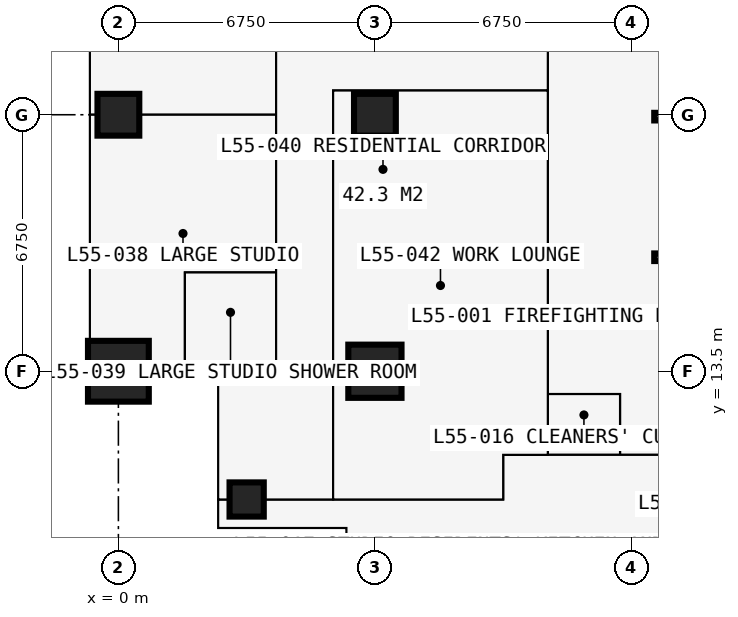
"""IFC4 building model, lengths in metres.
Left out: names, types, materials, properties, quantities, classifications, styles, units other than length and angle.
Written with IfcOpenShell. Run it as: python <this file> out.ifc"""

import sys

from ifc_helpers import new_model, si_unit, direction, frame, frame_2d, origin, origin_2d, place, context, subcontext, project, spatial, rectangle, extrude, element, fill, save


model = new_model("IFC4")
c1 = context("Model", 3, precision=1e-05, world=origin(), true_north=direction((0.0, 1.0)))
c2 = subcontext(c1, "Body", "Model", "MODEL_VIEW")
j1 = project(units=[si_unit("LENGTHUNIT", "METRE"), si_unit("PLANEANGLEUNIT", "RADIAN")], contexts=[c1])
p1 = place(None, origin())
s1 = spatial("IfcSite", under=j1, at=p1, CompositionType="ELEMENT")
p2 = place(p1, origin())
s2 = spatial("IfcBuilding", under=s1, at=p2, CompositionType="ELEMENT")
p3 = place(p2, frame((0.0, 0.0, 204.3)))
s3 = spatial("IfcBuildingStorey", under=s2, at=p3, CompositionType="ELEMENT", Elevation=204.3)
p4 = place(p3, frame((0.0, 13.5, 0.0), z_axis=(0.0, 0.0, 1.0), x_axis=(1.0, 0.0, 0.0)))
e1 = element("IfcColumn", 1, at=p4, inside=s3, PredefinedType="COLUMN", context=c2, shape_type="SweptSolid", body=[
    extrude(rectangle(XDim=1.6, YDim=1.6, at=origin_2d()), origin(), (0.0, 0.0, 1.0), 3.6),
])
p5 = place(p3, frame((0.0, 20.25, 0.0), z_axis=(0.0, 0.0, 1.0), x_axis=(1.0, 0.0, 0.0)))
e2 = element("IfcColumn", 2, at=p5, inside=s3, PredefinedType="COLUMN", context=c2, shape_type="SweptSolid", body=[
    extrude(rectangle(XDim=1.1, YDim=1.1, at=origin_2d()), origin(), (0.0, 0.0, 1.0), 3.6),
])
p6 = place(p3, frame((3.375, 10.125, 0.0), z_axis=(0.0, 0.0, 1.0), x_axis=(1.0, 0.0, 0.0)))
e3 = element("IfcColumn", 3, at=p6, inside=s3, PredefinedType="COLUMN", context=c2, shape_type="SweptSolid", body=[
    extrude(rectangle(XDim=0.9, YDim=0.9, at=origin_2d()), origin(), (0.0, 0.0, 1.0), 3.6),
])
p7 = place(p3, frame((6.75, 13.5, 0.0), z_axis=(0.0, 0.0, 1.0), x_axis=(1.0, 0.0, 0.0)))
e4 = element("IfcColumn", 4, at=p7, inside=s3, PredefinedType="COLUMN", context=c2, shape_type="SweptSolid", body=[
    extrude(rectangle(XDim=1.4, YDim=1.4, at=origin_2d()), origin(), (0.0, 0.0, 1.0), 3.6),
])
p8 = place(p3, frame((6.75, 20.25, 0.0), z_axis=(0.0, 0.0, 1.0), x_axis=(1.0, 0.0, 0.0)))
e5 = element("IfcColumn", 5, at=p8, inside=s3, PredefinedType="COLUMN", context=c2, shape_type="SweptSolid", body=[
    extrude(rectangle(XDim=1.1, YDim=1.1, at=origin_2d()), origin(), (0.0, 0.0, 1.0), 3.6),
])
p9 = place(p3, frame((13.2, 13.5, 0.0), z_axis=(0.0, 0.0, 1.0), x_axis=(1.0, 0.0, 0.0)))
e6 = element("IfcWall", 6, at=p9, inside=s3, PredefinedType="SHEAR", context=c2, shape_type="SweptSolid", body=[
    extrude(rectangle(XDim=14.1, YDim=1.2, at=frame_2d((7.05, 0.0))), origin(), (0.0, 0.0, 1.0), 3.6),
])
p10 = place(p3, frame((13.65, 26.4, 0.0), z_axis=(0.0, 0.0, 1.0), x_axis=(0.0, -1.0, 0.0)))
e7 = element("IfcWall", 7, at=p10, inside=s3, PredefinedType="SHEAR", context=c2, shape_type="SweptSolid", body=[
    extrude(rectangle(XDim=12.3, YDim=0.9, at=frame_2d((6.15, 0.0))), origin(), (0.0, 0.0, 1.0), 3.6),
])
p11 = place(p10, frame((7.45, 0.0, 0.0)))
e8 = element("IfcOpeningElement", 8, at=p11, cuts=e7, PredefinedType="OPENING", context=c2, shape_type="SweptSolid", body=[
    extrude(rectangle(XDim=1.2, YDim=2.2, at=frame_2d((0.6, 1.1))), frame((0.0, 0.46, 0.0), z_axis=(0.0, -1.0, 0.0), x_axis=(1.0, 0.0, 0.0)), (0.0, 0.0, 1.0), 0.92),
])
p12 = place(p3, frame((-0.75, 12.75, 0.0), z_axis=(0.0, 0.0, 1.0), x_axis=(1.0, 0.0, 0.0)))
e9 = element("IfcWall", 9, at=p12, inside=s3, PredefinedType="SOLIDWALL", context=c2, shape_type="SweptSolid", body=[
    extrude(rectangle(XDim=3.375, YDim=0.3, at=frame_2d((1.688, 0.0))), origin(), (0.0, 0.0, 1.0), 3.375),
])
p13 = place(p12, frame((1.633, 0.0, 0.9)))
e10 = element("IfcOpeningElement", 10, at=p13, cuts=e9, PredefinedType="OPENING", context=c2, shape_type="SweptSolid", body=[
    extrude(rectangle(XDim=1.5, YDim=1.8, at=frame_2d((0.75, 0.9))), frame((0.0, 0.16, 0.0), z_axis=(0.0, -1.0, 0.0), x_axis=(1.0, 0.0, 0.0)), (0.0, 0.0, 1.0), 0.32),
])
p14 = place(p3, frame((2.625, 12.75, 0.0), z_axis=(0.0, 0.0, 1.0), x_axis=(0.0, -1.0, 0.0)))
e11 = element("IfcWall", 11, at=p14, inside=s3, PredefinedType="SOLIDWALL", context=c2, shape_type="SweptSolid", body=[
    extrude(rectangle(XDim=3.375, YDim=0.3, at=frame_2d((1.688, 0.0))), origin(), (0.0, 0.0, 1.0), 3.375),
])
p15 = place(p14, frame((0.788, 0.0, 0.6)))
e12 = element("IfcOpeningElement", 12, at=p15, cuts=e11, PredefinedType="OPENING", context=c2, shape_type="SweptSolid", body=[
    extrude(rectangle(XDim=1.8, YDim=2.1, at=frame_2d((0.9, 1.05))), frame((0.0, 0.16, 0.0), z_axis=(0.0, -1.0, 0.0), x_axis=(1.0, 0.0, 0.0)), (0.0, 0.0, 1.0), 0.32),
])
p16 = place(p3, frame((2.625, 9.375, 0.0), z_axis=(0.0, 0.0, 1.0), x_axis=(1.0, 0.0, 0.0)))
e13 = element("IfcWall", 13, at=p16, inside=s3, PredefinedType="SOLIDWALL", context=c2, shape_type="SweptSolid", body=[
    extrude(rectangle(XDim=3.375, YDim=0.3, at=frame_2d((1.688, 0.0))), origin(), (0.0, 0.0, 1.0), 3.375),
])
p17 = place(p16, frame((0.788, 0.0, 0.6)))
e14 = element("IfcOpeningElement", 14, at=p17, cuts=e13, PredefinedType="OPENING", context=c2, shape_type="SweptSolid", body=[
    extrude(rectangle(XDim=1.8, YDim=2.1, at=frame_2d((0.9, 1.05))), frame((0.0, 0.16, 0.0), z_axis=(0.0, -1.0, 0.0), x_axis=(1.0, 0.0, 0.0)), (0.0, 0.0, 1.0), 0.32),
])
p18 = place(p3, frame((6.0, 9.375, 0.0), z_axis=(0.0, 0.0, 1.0), x_axis=(0.0, -1.0, 0.0)))
e15 = element("IfcWall", 15, at=p18, inside=s3, PredefinedType="SOLIDWALL", context=c2, shape_type="SweptSolid", body=[
    extrude(rectangle(XDim=3.375, YDim=0.3, at=frame_2d((1.688, 0.0))), origin(), (0.0, 0.0, 1.0), 3.375),
])
p19 = place(p18, frame((0.788, 0.0, 0.6)))
e16 = element("IfcOpeningElement", 16, at=p19, cuts=e15, PredefinedType="OPENING", context=c2, shape_type="SweptSolid", body=[
    extrude(rectangle(XDim=1.8, YDim=2.1, at=frame_2d((0.9, 1.05))), frame((0.0, 0.16, 0.0), z_axis=(0.0, -1.0, 0.0), x_axis=(1.0, 0.0, 0.0)), (0.0, 0.0, 1.0), 0.32),
])
p20 = place(p3, frame((1.15, 7.4, -0.06), z_axis=(0.0, 0.0, 1.0), x_axis=(0.0, 1.0, 0.0)))
e17 = element("IfcWall", 17, at=p20, inside=s3, PredefinedType="USERDEFINED", context=c2, shape_type="SweptSolid", body=[
    extrude(rectangle(XDim=3.75, YDim=0.8, at=frame_2d((1.875, 0.0))), origin(), (0.0, 0.0, 1.0), 0.66),
])
p21 = place(p3, frame((14.1, 16.5, 0.0), z_axis=(0.0, 0.0, 1.0), x_axis=(1.0, 0.0, 0.0)))
e18 = element("IfcWall", 18, at=p21, inside=s3, PredefinedType="SHEAR", context=c2, shape_type="SweptSolid", body=[
    extrude(rectangle(XDim=12.3, YDim=0.2, at=frame_2d((6.15, 0.0))), origin(), (0.0, 0.0, 1.0), 3.6),
])
p22 = place(p21, frame((0.9, 0.0, 0.0)))
e19 = element("IfcOpeningElement", 19, at=p22, cuts=e18, PredefinedType="OPENING", context=c2, shape_type="SweptSolid", body=[
    extrude(rectangle(XDim=1.1, YDim=2.2, at=frame_2d((0.55, 1.1))), frame((0.0, 0.11, 0.0), z_axis=(0.0, -1.0, 0.0), x_axis=(1.0, 0.0, 0.0)), (0.0, 0.0, 1.0), 0.22),
])
p23 = place(p21, frame((4.31, 0.0, 0.0)))
e20 = element("IfcOpeningElement", 20, at=p23, cuts=e18, PredefinedType="OPENING", context=c2, shape_type="SweptSolid", body=[
    extrude(rectangle(XDim=1.1, YDim=2.2, at=frame_2d((0.55, 1.1))), frame((0.0, 0.11, 0.0), z_axis=(0.0, -1.0, 0.0), x_axis=(1.0, 0.0, 0.0)), (0.0, 0.0, 1.0), 0.22),
])
p24 = place(p21, frame((6.45, 0.0, 0.0)))
e21 = element("IfcOpeningElement", 21, at=p24, cuts=e18, PredefinedType="OPENING", context=c2, shape_type="SweptSolid", body=[
    extrude(rectangle(XDim=1.1, YDim=2.2, at=frame_2d((0.55, 1.1))), frame((0.0, 0.11, 0.0), z_axis=(0.0, -1.0, 0.0), x_axis=(1.0, 0.0, 0.0)), (0.0, 0.0, 1.0), 0.22),
])
p25 = place(p21, frame((9.5, 0.0, 0.0)))
e22 = element("IfcOpeningElement", 22, at=p25, cuts=e18, PredefinedType="OPENING", context=c2, shape_type="SweptSolid", body=[
    extrude(rectangle(XDim=1.1, YDim=2.2, at=frame_2d((0.55, 1.1))), frame((0.0, 0.11, 0.0), z_axis=(0.0, -1.0, 0.0), x_axis=(1.0, 0.0, 0.0)), (0.0, 0.0, 1.0), 0.22),
])
p26 = place(p3, frame((14.1, 20.2, 0.0), z_axis=(0.0, 0.0, 1.0), x_axis=(1.0, 0.0, 0.0)))
e23 = element("IfcWall", 23, at=p26, inside=s3, PredefinedType="SHEAR", context=c2, shape_type="SweptSolid", body=[
    extrude(rectangle(XDim=12.3, YDim=0.2, at=frame_2d((6.15, 0.0))), origin(), (0.0, 0.0, 1.0), 3.6),
])
p27 = place(p26, frame((4.56, 0.0, 0.0)))
e24 = element("IfcOpeningElement", 24, at=p27, cuts=e23, PredefinedType="OPENING", context=c2, shape_type="SweptSolid", body=[
    extrude(rectangle(XDim=1.1, YDim=2.2, at=frame_2d((0.55, 1.1))), frame((0.0, 0.11, 0.0), z_axis=(0.0, -1.0, 0.0), x_axis=(1.0, 0.0, 0.0)), (0.0, 0.0, 1.0), 0.22),
])
p28 = place(p26, frame((6.7, 0.0, 0.0)))
e25 = element("IfcOpeningElement", 25, at=p28, cuts=e23, PredefinedType="OPENING", context=c2, shape_type="SweptSolid", body=[
    extrude(rectangle(XDim=1.1, YDim=2.2, at=frame_2d((0.55, 1.1))), frame((0.0, 0.11, 0.0), z_axis=(0.0, -1.0, 0.0), x_axis=(1.0, 0.0, 0.0)), (0.0, 0.0, 1.0), 0.22),
])
p29 = place(p26, frame((0.35, 0.0, 0.0)))
e26 = element("IfcOpeningElement", 26, at=p29, cuts=e23, PredefinedType="OPENING", context=c2, shape_type="SweptSolid", body=[
    extrude(rectangle(XDim=1.1, YDim=2.2, at=frame_2d((0.55, 1.1))), frame((0.0, 0.11, 0.0), z_axis=(0.0, -1.0, 0.0), x_axis=(1.0, 0.0, 0.0)), (0.0, 0.0, 1.0), 0.22),
])
p30 = place(p26, frame((9.75, 0.0, 0.0)))
e27 = element("IfcOpeningElement", 27, at=p30, cuts=e23, PredefinedType="OPENING", context=c2, shape_type="SweptSolid", body=[
    extrude(rectangle(XDim=1.1, YDim=2.2, at=frame_2d((0.55, 1.1))), frame((0.0, 0.11, 0.0), z_axis=(0.0, -1.0, 0.0), x_axis=(1.0, 0.0, 0.0)), (0.0, 0.0, 1.0), 0.22),
])
p31 = place(p3, frame((-0.734, 13.5, 0.0), z_axis=(0.0, 0.0, 1.0), x_axis=(1.0, 0.0, 0.0)))
e28 = element("IfcWall", 28, at=p31, inside=s3, PredefinedType="PARTITIONING", context=c2, shape_type="SweptSolid", body=[
    extrude(rectangle(XDim=4.884, YDim=0.175, at=frame_2d((2.442, 0.0))), origin(), (0.0, 0.0, 1.0), 2.877),
])
p32 = place(p3, frame((-0.734, 20.25, 0.0), z_axis=(0.0, 0.0, 1.0), x_axis=(1.0, 0.0, 0.0)))
e29 = element("IfcWall", 29, at=p32, inside=s3, PredefinedType="PARTITIONING", context=c2, shape_type="SweptSolid", body=[
    extrude(rectangle(XDim=4.884, YDim=0.15, at=frame_2d((2.442, 0.0))), origin(), (0.0, 0.0, 1.0), 2.877),
])
p33 = place(p3, frame((1.75, 13.5, 0.0), z_axis=(0.0, 0.0, 1.0), x_axis=(0.0, 1.0, 0.0)))
e30 = element("IfcWall", 30, at=p33, inside=s3, PredefinedType="PARTITIONING", context=c2, shape_type="SweptSolid", body=[
    extrude(rectangle(XDim=2.6, YDim=0.1, at=frame_2d((1.3, 0.0))), origin(), (0.0, 0.0, 1.0), 3.375),
])
p34 = place(p33, frame((0.85, 0.0, 0.0)))
e31 = element("IfcOpeningElement", 31, at=p34, cuts=e30, PredefinedType="OPENING", context=c2, shape_type="SweptSolid", body=[
    extrude(rectangle(XDim=0.9, YDim=2.2, at=frame_2d((0.45, 1.1))), frame((0.0, 0.06, 0.0), z_axis=(0.0, -1.0, 0.0), x_axis=(1.0, 0.0, 0.0)), (0.0, 0.0, 1.0), 0.12),
])
p35 = place(p3, frame((1.75, 16.1, 0.0), z_axis=(0.0, 0.0, 1.0), x_axis=(1.0, 0.0, 0.0)))
e32 = element("IfcWall", 32, at=p35, inside=s3, PredefinedType="PARTITIONING", context=c2, shape_type="SweptSolid", body=[
    extrude(rectangle(XDim=2.4, YDim=0.1, at=frame_2d((1.2, 0.0))), origin(), (0.0, 0.0, 1.0), 3.375),
])
p36 = place(p3, frame((2.625, 12.766, 0.0), z_axis=(0.0, 0.0, 1.0), x_axis=(0.0, 1.0, 0.0)))
e33 = element("IfcWall", 33, at=p36, inside=s3, PredefinedType="PARTITIONING", context=c2, shape_type="SweptSolid", body=[
    extrude(rectangle(XDim=0.734, YDim=0.15, at=frame_2d((0.367, 0.0))), origin(), (0.0, 0.0, 1.0), 3.375),
])
p37 = place(p3, frame((2.775, 10.125, 0.0), z_axis=(0.0, 0.0, 1.0), x_axis=(1.0, 0.0, 0.0)))
e34 = element("IfcWall", 34, at=p37, inside=s3, PredefinedType="PARTITIONING", context=c2, shape_type="SweptSolid", body=[
    extrude(rectangle(XDim=7.35, YDim=0.15, at=frame_2d((3.675, 0.0))), origin(), (0.0, 0.0, 1.0), 2.877),
])
p38 = place(p37, frame((1.066, 0.0, 0.0)))
e35 = element("IfcOpeningElement", 35, at=p38, cuts=e34, PredefinedType="OPENING", context=c2, shape_type="SweptSolid", body=[
    extrude(rectangle(XDim=1.0, YDim=2.2, at=frame_2d((0.5, 1.1))), frame((0.0, 0.085, 0.0), z_axis=(0.0, -1.0, 0.0), x_axis=(1.0, 0.0, 0.0)), (0.0, 0.0, 1.0), 0.17),
])
p39 = place(p3, frame((4.15, 13.5, 0.0), z_axis=(0.0, 0.0, 1.0), x_axis=(0.0, 1.0, 0.0)))
e36 = element("IfcWall", 36, at=p39, inside=s3, PredefinedType="PARTITIONING", context=c2, shape_type="SweptSolid", body=[
    extrude(rectangle(XDim=13.5, YDim=0.15, at=frame_2d((6.75, 0.0))), origin(), (0.0, 0.0, 1.0), 3.375),
])
p40 = place(p39, frame((4.2, 0.0, 0.0)))
e37 = element("IfcOpeningElement", 37, at=p40, cuts=e36, PredefinedType="OPENING", context=c2, shape_type="SweptSolid", body=[
    extrude(rectangle(XDim=0.95, YDim=2.2, at=frame_2d((0.475, 1.1))), frame((0.0, 0.085, 0.0), z_axis=(0.0, -1.0, 0.0), x_axis=(1.0, 0.0, 0.0)), (0.0, 0.0, 1.0), 0.17),
])
p41 = place(p3, frame((5.65, 10.125, 0.0), z_axis=(0.0, 0.0, 1.0), x_axis=(0.0, 1.0, 0.0)))
e38 = element("IfcWall", 38, at=p41, inside=s3, PredefinedType="PARTITIONING", context=c2, shape_type="SweptSolid", body=[
    extrude(rectangle(XDim=10.762, YDim=0.15, at=frame_2d((5.381, 0.0))), origin(), (0.0, 0.0, 1.0), 3.375),
])
p42 = place(p41, frame((4.9, 0.0, 0.0)))
e39 = element("IfcOpeningElement", 39, at=p42, cuts=e38, PredefinedType="OPENING", context=c2, shape_type="SweptSolid", body=[
    extrude(rectangle(XDim=0.95, YDim=2.2, at=frame_2d((0.475, 1.1))), frame((0.0, 0.085, 0.0), z_axis=(0.0, -1.0, 0.0), x_axis=(1.0, 0.0, 0.0)), (0.0, 0.0, 1.0), 0.17),
])
p43 = place(p3, frame((5.65, 20.887, 0.0), z_axis=(0.0, 0.0, 1.0), x_axis=(1.0, 0.0, 0.0)))
e40 = element("IfcWall", 40, at=p43, inside=s3, PredefinedType="PARTITIONING", context=c2, shape_type="SweptSolid", body=[
    extrude(rectangle(XDim=5.65, YDim=0.15, at=frame_2d((2.825, 0.0))), origin(), (0.0, 0.0, 1.0), 3.375),
])
p44 = place(p3, frame((10.125, 10.125, 0.0), z_axis=(0.0, 0.0, 1.0), x_axis=(0.0, 1.0, 0.0)))
e41 = element("IfcWall", 41, at=p44, inside=s3, PredefinedType="PARTITIONING", context=c2, shape_type="SweptSolid", body=[
    extrude(rectangle(XDim=1.175, YDim=0.15, at=frame_2d((0.587, 0.0))), origin(), (0.0, 0.0, 1.0), 3.375),
])
p45 = place(p3, frame((10.125, 11.3, 0.0), z_axis=(0.0, 0.0, 1.0), x_axis=(1.0, 0.0, 0.0)))
e42 = element("IfcWall", 42, at=p45, inside=s3, PredefinedType="PARTITIONING", context=c2, shape_type="SweptSolid", body=[
    extrude(rectangle(XDim=20.25, YDim=0.15, at=frame_2d((10.125, 0.0))), origin(), (0.0, 0.0, 1.0), 3.375),
])
p46 = place(p45, frame((11.725, 0.0, 0.0)))
e43 = element("IfcOpeningElement", 43, at=p46, cuts=e42, PredefinedType="OPENING", context=c2, shape_type="SweptSolid", body=[
    extrude(rectangle(XDim=0.95, YDim=2.2, at=frame_2d((0.475, 1.1))), frame((0.0, 0.085, 0.0), z_axis=(0.0, -1.0, 0.0), x_axis=(1.0, 0.0, 0.0)), (0.0, 0.0, 1.0), 0.17),
])
p47 = place(p45, frame((17.475, 0.0, 0.0)))
e44 = element("IfcOpeningElement", 44, at=p47, cuts=e42, PredefinedType="OPENING", context=c2, shape_type="SweptSolid", body=[
    extrude(rectangle(XDim=1.0, YDim=2.2, at=frame_2d((0.5, 1.1))), frame((0.0, 0.085, 0.0), z_axis=(0.0, -1.0, 0.0), x_axis=(1.0, 0.0, 0.0)), (0.0, 0.0, 1.0), 0.17),
])
p48 = place(p45, frame((7.95, 0.0, 0.0)))
e45 = element("IfcOpeningElement", 45, at=p48, cuts=e42, PredefinedType="OPENING", context=c2, shape_type="SweptSolid", body=[
    extrude(rectangle(XDim=0.95, YDim=2.2, at=frame_2d((0.475, 1.1))), frame((0.0, 0.085, 0.0), z_axis=(0.0, -1.0, 0.0), x_axis=(1.0, 0.0, 0.0)), (0.0, 0.0, 1.0), 0.17),
])
p49 = place(p3, frame((11.3, 11.3, 0.0), z_axis=(0.0, 0.0, 1.0), x_axis=(0.0, 1.0, 0.0)))
e46 = element("IfcWall", 46, at=p49, inside=s3, PredefinedType="PARTITIONING", context=c2, shape_type="SweptSolid", body=[
    extrude(rectangle(XDim=19.3, YDim=0.15, at=frame_2d((9.65, 0.0))), origin(), (0.0, 0.0, 1.0), 3.375),
])
p50 = place(p49, frame((18.1, 0.0, 0.0)))
e47 = element("IfcOpeningElement", 47, at=p50, cuts=e46, PredefinedType="OPENING", context=c2, shape_type="SweptSolid", body=[
    extrude(rectangle(XDim=1.0, YDim=2.2, at=frame_2d((0.5, 1.1))), frame((0.0, 0.085, 0.0), z_axis=(0.0, -1.0, 0.0), x_axis=(1.0, 0.0, 0.0)), (0.0, 0.0, 1.0), 0.17),
])
p51 = place(p49, frame((10.137, 0.0, 0.0)))
e48 = element("IfcOpeningElement", 48, at=p51, cuts=e46, PredefinedType="OPENING", context=c2, shape_type="SweptSolid", body=[
    extrude(rectangle(XDim=1.0, YDim=2.2, at=frame_2d((0.5, 1.1))), frame((0.0, 0.085, 0.0), z_axis=(0.0, -1.0, 0.0), x_axis=(1.0, 0.0, 0.0)), (0.0, 0.0, 1.0), 0.17),
])
p52 = place(p3, frame((11.3, 12.9, 0.0), z_axis=(0.0, 0.0, 1.0), x_axis=(1.0, 0.0, 0.0)))
e49 = element("IfcWall", 49, at=p52, inside=s3, PredefinedType="PARTITIONING", context=c2, shape_type="SweptSolid", body=[
    extrude(rectangle(XDim=1.9, YDim=0.15, at=frame_2d((0.95, 0.0))), origin(), (0.0, 0.0, 1.0), 2.806),
])
p53 = place(p52, frame((0.45, 0.0, 0.0)))
e50 = element("IfcOpeningElement", 50, at=p53, cuts=e49, PredefinedType="OPENING", context=c2, shape_type="SweptSolid", body=[
    extrude(rectangle(XDim=0.95, YDim=2.2, at=frame_2d((0.475, 1.1))), frame((0.0, 0.085, 0.0), z_axis=(0.0, -1.0, 0.0), x_axis=(1.0, 0.0, 0.0)), (0.0, 0.0, 1.0), 0.17),
])
p54 = place(p3, frame((13.2, 11.3, 0.0), z_axis=(0.0, 0.0, 1.0), x_axis=(0.0, 1.0, 0.0)))
e51 = element("IfcWall", 51, at=p54, inside=s3, PredefinedType="PARTITIONING", context=c2, shape_type="SweptSolid", body=[
    extrude(rectangle(XDim=1.6, YDim=0.15, at=frame_2d((0.8, 0.0))), origin(), (0.0, 0.0, 1.0), 3.375),
])
p55 = place(p13, origin())
e52 = element("IfcWindow", 52, at=p55, inside=s3, PartitioningType="SINGLE_PANEL", PredefinedType="WINDOW", context=c2, shape_type="SweptSolid", body=[
    extrude(rectangle(XDim=1.5, YDim=1.8, at=frame_2d((0.75, 0.9))), frame((0.0, 0.03, 0.0), z_axis=(0.0, -1.0, 0.0), x_axis=(1.0, 0.0, 0.0)), (0.0, 0.0, 1.0), 0.06),
])
fill(e10, e52)
p56 = place(p15, origin())
e53 = element("IfcWindow", 53, at=p56, inside=s3, PartitioningType="SINGLE_PANEL", PredefinedType="WINDOW", context=c2, shape_type="SweptSolid", body=[
    extrude(rectangle(XDim=1.8, YDim=2.1, at=frame_2d((0.9, 1.05))), frame((0.0, 0.03, 0.0), z_axis=(0.0, -1.0, 0.0), x_axis=(1.0, 0.0, 0.0)), (0.0, 0.0, 1.0), 0.06),
])
fill(e12, e53)
p57 = place(p17, origin())
e54 = element("IfcWindow", 54, at=p57, inside=s3, PartitioningType="SINGLE_PANEL", PredefinedType="WINDOW", context=c2, shape_type="SweptSolid", body=[
    extrude(rectangle(XDim=1.8, YDim=2.1, at=frame_2d((0.9, 1.05))), frame((0.0, 0.03, 0.0), z_axis=(0.0, -1.0, 0.0), x_axis=(1.0, 0.0, 0.0)), (0.0, 0.0, 1.0), 0.06),
])
fill(e14, e54)
p58 = place(p11, origin())
e55 = element("IfcDoor", 55, at=p58, inside=s3, OperationType="DOUBLE_DOOR_SINGLE_SWING", PredefinedType="DOOR", context=c2, shape_type="SweptSolid", body=[
    extrude(rectangle(XDim=1.2, YDim=2.2, at=frame_2d((0.6, 1.1))), frame((0.0, 0.025, 0.0), z_axis=(0.0, -1.0, 0.0), x_axis=(1.0, 0.0, 0.0)), (0.0, 0.0, 1.0), 0.05),
])
fill(e8, e55)
p59 = place(p53, origin())
e56 = element("IfcDoor", 56, at=p59, inside=s3, OperationType="SINGLE_SWING_LEFT", PredefinedType="DOOR", context=c2, shape_type="SweptSolid", body=[
    extrude(rectangle(XDim=0.95, YDim=2.2, at=frame_2d((0.475, 1.1))), frame((0.0, 0.025, 0.0), z_axis=(0.0, -1.0, 0.0), x_axis=(1.0, 0.0, 0.0)), (0.0, 0.0, 1.0), 0.05),
])
fill(e50, e56)
p60 = place(p38, origin())
e57 = element("IfcDoor", 57, at=p60, inside=s3, OperationType="SINGLE_SWING_LEFT", PredefinedType="DOOR", context=c2, shape_type="SweptSolid", body=[
    extrude(rectangle(XDim=1.0, YDim=2.2, at=frame_2d((0.5, 1.1))), frame((0.0, 0.025, 0.0), z_axis=(0.0, -1.0, 0.0), x_axis=(1.0, 0.0, 0.0)), (0.0, 0.0, 1.0), 0.05),
])
fill(e35, e57)
p61 = place(p40, origin())
e58 = element("IfcDoor", 58, at=p61, inside=s3, OperationType="SINGLE_SWING_LEFT", PredefinedType="DOOR", context=c2, shape_type="SweptSolid", body=[
    extrude(rectangle(XDim=0.95, YDim=2.2, at=frame_2d((0.475, 1.1))), frame((0.0, 0.025, 0.0), z_axis=(0.0, -1.0, 0.0), x_axis=(1.0, 0.0, 0.0)), (0.0, 0.0, 1.0), 0.05),
])
fill(e37, e58)
p62 = place(p34, origin())
e59 = element("IfcDoor", 59, at=p62, inside=s3, OperationType="SINGLE_SWING_RIGHT", PredefinedType="DOOR", context=c2, shape_type="SweptSolid", body=[
    extrude(rectangle(XDim=0.9, YDim=2.2, at=frame_2d((0.45, 1.1))), frame((0.0, 0.025, 0.0), z_axis=(0.0, -1.0, 0.0), x_axis=(1.0, 0.0, 0.0)), (0.0, 0.0, 1.0), 0.05),
])
fill(e31, e59)
p63 = place(p51, origin())
e60 = element("IfcDoor", 60, at=p63, inside=s3, OperationType="SINGLE_SWING_LEFT", PredefinedType="DOOR", context=c2, shape_type="SweptSolid", body=[
    extrude(rectangle(XDim=1.0, YDim=2.2, at=frame_2d((0.5, 1.1))), frame((0.0, 0.025, 0.0), z_axis=(0.0, -1.0, 0.0), x_axis=(1.0, 0.0, 0.0)), (0.0, 0.0, 1.0), 0.05),
])
fill(e48, e60)
p64 = place(p42, origin())
e61 = element("IfcDoor", 61, at=p64, inside=s3, OperationType="SINGLE_SWING_LEFT", PredefinedType="DOOR", context=c2, shape_type="SweptSolid", body=[
    extrude(rectangle(XDim=0.95, YDim=2.2, at=frame_2d((0.475, 1.1))), frame((0.0, 0.025, 0.0), z_axis=(0.0, -1.0, 0.0), x_axis=(1.0, 0.0, 0.0)), (0.0, 0.0, 1.0), 0.05),
])
fill(e39, e61)
save(model, sys.argv[1])
